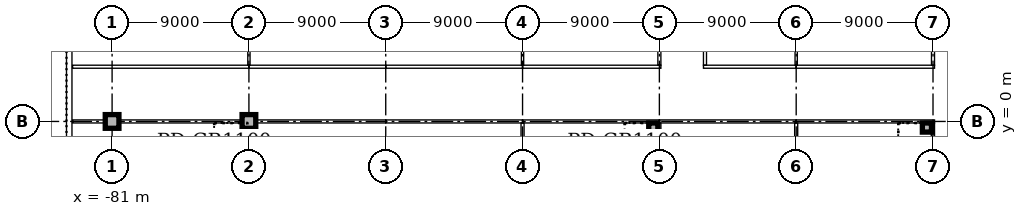
"""IFC4 building model, lengths in metres.
Left out: names, types, materials, properties, quantities, classifications, styles, units other than length and angle.
Written with IfcOpenShell. Run it as: python <this file> out.ifc"""

import sys

from ifc_helpers import new_model, si_unit, direction, frame, frame_2d, origin, origin_2d, place, context, subcontext, project, spatial, rectangle, extrude, element, fill, save


model = new_model("IFC4")
c1 = context("Model", 3, precision=1e-05, world=origin(), true_north=direction((0.0, 1.0)))
c2 = subcontext(c1, "Body", "Model", "MODEL_VIEW")
j1 = project(units=[si_unit("LENGTHUNIT", "METRE"), si_unit("PLANEANGLEUNIT", "RADIAN")], contexts=[c1])
p1 = place(None, origin())
s1 = spatial("IfcSite", under=j1, at=p1, CompositionType="ELEMENT")
p2 = place(p1, origin())
s2 = spatial("IfcBuilding", under=s1, at=p2, CompositionType="ELEMENT")
p3 = place(p2, origin())
s3 = spatial("IfcBuildingStorey", under=s2, at=p3, CompositionType="ELEMENT", Elevation=0.0)
for number, where, z_axis, x_axis in (
    (1, (-81.0, 0.0, 0.0), (0.0, 0.0, 1.0), (1.0, 0.0, 0.0)),
    (2, (-72.0, 0.0, 0.0), (0.0, 0.0, 1.0), (1.0, 0.0, 0.0)),
):
    element("IfcColumn", number, at=place(p3, frame(where, z_axis=z_axis, x_axis=x_axis)), inside=s3, PredefinedType="COLUMN", context=c2, shape_type="SweptSolid", body=[
        extrude(rectangle(XDim=0.9, YDim=0.9, at=origin_2d()), origin(), (0.0, 0.0, 1.0), 5.7),
    ])
p4 = place(p3, frame((-83.82, 54.0, 0.0), z_axis=(0.0, 0.0, 1.0), x_axis=(0.0, -1.0, 0.0)))
e3 = element("IfcWall", 3, at=p4, inside=s3, PredefinedType="STANDARD", context=c2, shape_type="SweptSolid", body=[
    extrude(rectangle(XDim=63.0, YDim=0.36, at=frame_2d((31.5, 0.0))), origin(), (0.0, 0.0, 1.0), 5.7),
])
p5 = place(p4, frame((41.4, 0.0, 0.0)))
e4 = element("IfcOpeningElement", 4, at=p5, cuts=e3, PredefinedType="OPENING", context=c2, shape_type="SweptSolid", body=[
    extrude(rectangle(XDim=1.2, YDim=2.2, at=frame_2d((0.6, 1.1))), frame((0.0, 0.19, 0.0), z_axis=(0.0, -1.0, 0.0), x_axis=(1.0, 0.0, 0.0)), (0.0, 0.0, 1.0), 0.38),
])
p6 = place(p4, frame((30.3, 0.0, 0.0)))
e5 = element("IfcOpeningElement", 5, at=p6, cuts=e3, PredefinedType="OPENING", context=c2, shape_type="SweptSolid", body=[
    extrude(rectangle(XDim=2.4, YDim=2.2, at=frame_2d((1.2, 1.1))), frame((0.0, 0.19, 0.0), z_axis=(0.0, -1.0, 0.0), x_axis=(1.0, 0.0, 0.0)), (0.0, 0.0, 1.0), 0.38),
])
p7 = place(p4, frame((11.85, 0.0, 0.6)))
e6 = element("IfcOpeningElement", 6, at=p7, cuts=e3, PredefinedType="OPENING", context=c2, shape_type="SweptSolid", body=[
    extrude(rectangle(XDim=3.3, YDim=3.0, at=frame_2d((1.65, 1.5))), frame((0.0, 0.19, 0.0), z_axis=(0.0, -1.0, 0.0), x_axis=(1.0, 0.0, 0.0)), (0.0, 0.0, 1.0), 0.38),
])
p8 = place(p4, frame((16.35, 0.0, 0.6)))
e7 = element("IfcOpeningElement", 7, at=p8, cuts=e3, PredefinedType="OPENING", context=c2, shape_type="SweptSolid", body=[
    extrude(rectangle(XDim=3.3, YDim=3.0, at=frame_2d((1.65, 1.5))), frame((0.0, 0.19, 0.0), z_axis=(0.0, -1.0, 0.0), x_axis=(1.0, 0.0, 0.0)), (0.0, 0.0, 1.0), 0.38),
])
p9 = place(p4, frame((20.85, 0.0, 0.6)))
e8 = element("IfcOpeningElement", 8, at=p9, cuts=e3, PredefinedType="OPENING", context=c2, shape_type="SweptSolid", body=[
    extrude(rectangle(XDim=3.3, YDim=3.0, at=frame_2d((1.65, 1.5))), frame((0.0, 0.19, 0.0), z_axis=(0.0, -1.0, 0.0), x_axis=(1.0, 0.0, 0.0)), (0.0, 0.0, 1.0), 0.38),
])
p10 = place(p4, frame((25.35, 0.0, 0.6)))
e9 = element("IfcOpeningElement", 9, at=p10, cuts=e3, PredefinedType="OPENING", context=c2, shape_type="SweptSolid", body=[
    extrude(rectangle(XDim=3.3, YDim=3.0, at=frame_2d((1.65, 1.5))), frame((0.0, 0.19, 0.0), z_axis=(0.0, -1.0, 0.0), x_axis=(1.0, 0.0, 0.0)), (0.0, 0.0, 1.0), 0.38),
])
p11 = place(p4, frame((34.35, 0.0, 0.6)))
e10 = element("IfcOpeningElement", 10, at=p11, cuts=e3, PredefinedType="OPENING", context=c2, shape_type="SweptSolid", body=[
    extrude(rectangle(XDim=3.3, YDim=3.0, at=frame_2d((1.65, 1.5))), frame((0.0, 0.19, 0.0), z_axis=(0.0, -1.0, 0.0), x_axis=(1.0, 0.0, 0.0)), (0.0, 0.0, 1.0), 0.38),
])
p12 = place(p4, frame((43.35, 0.0, 0.6)))
e11 = element("IfcOpeningElement", 11, at=p12, cuts=e3, PredefinedType="OPENING", context=c2, shape_type="SweptSolid", body=[
    extrude(rectangle(XDim=3.3, YDim=3.0, at=frame_2d((1.65, 1.5))), frame((0.0, 0.19, 0.0), z_axis=(0.0, -1.0, 0.0), x_axis=(1.0, 0.0, 0.0)), (0.0, 0.0, 1.0), 0.38),
])
p13 = place(p4, frame((47.85, 0.0, 0.6)))
e12 = element("IfcOpeningElement", 12, at=p13, cuts=e3, PredefinedType="OPENING", context=c2, shape_type="SweptSolid", body=[
    extrude(rectangle(XDim=3.3, YDim=3.0, at=frame_2d((1.65, 1.5))), frame((0.0, 0.19, 0.0), z_axis=(0.0, -1.0, 0.0), x_axis=(1.0, 0.0, 0.0)), (0.0, 0.0, 1.0), 0.38),
])
p14 = place(p4, frame((52.35, 0.0, 0.6)))
e13 = element("IfcOpeningElement", 13, at=p14, cuts=e3, PredefinedType="OPENING", context=c2, shape_type="SweptSolid", body=[
    extrude(rectangle(XDim=3.3, YDim=3.0, at=frame_2d((1.65, 1.5))), frame((0.0, 0.19, 0.0), z_axis=(0.0, -1.0, 0.0), x_axis=(1.0, 0.0, 0.0)), (0.0, 0.0, 1.0), 0.38),
])
p15 = place(p4, frame((56.85, 0.0, 0.6)))
e14 = element("IfcOpeningElement", 14, at=p15, cuts=e3, PredefinedType="OPENING", context=c2, shape_type="SweptSolid", body=[
    extrude(rectangle(XDim=3.3, YDim=3.0, at=frame_2d((1.65, 1.5))), frame((0.0, 0.19, 0.0), z_axis=(0.0, -1.0, 0.0), x_axis=(1.0, 0.0, 0.0)), (0.0, 0.0, 1.0), 0.38),
])
for number, where, z_axis, x_axis in (
    (15, (-45.4, -0.4, 0.0), (0.0, 0.0, 1.0), (1.0, 0.0, 0.0)),
    (16, (-27.4, -0.4, 0.0), (0.0, 0.0, 1.0), (1.0, 0.0, 0.0)),
):
    element("IfcColumn", number, at=place(p3, frame(where, z_axis=z_axis, x_axis=x_axis)), inside=s3, PredefinedType="COLUMN", context=c2, shape_type="SweptSolid", body=[
        extrude(rectangle(XDim=0.6, YDim=0.6, at=origin_2d()), origin(), (0.0, 0.0, 1.0), 6.0),
    ])
p16 = place(p3, frame((-83.6, 0.0, 0.0), z_axis=(0.0, 0.0, 1.0), x_axis=(1.0, 0.0, 0.0)))
e17 = element("IfcWall", 17, at=p16, inside=s3, PredefinedType="SOLIDWALL", context=c2, shape_type="SweptSolid", body=[
    extrude(rectangle(XDim=2.13, YDim=0.2, at=frame_2d((1.065, 0.0))), origin(), (0.0, 0.0, 1.0), 5.7),
])
for number, where, z_axis, x_axis in (
    (18, (-80.53, 0.0, 0.0), (0.0, 0.0, 1.0), (1.0, 0.0, 0.0)),
    (19, (-72.0, -8.53, 0.0), (0.0, 0.0, 1.0), (0.0, 1.0, 0.0)),
):
    element("IfcWall", number, at=place(p3, frame(where, z_axis=z_axis, x_axis=x_axis)), inside=s3, PredefinedType="SOLIDWALL", context=c2, shape_type="SweptSolid", body=[
        extrude(rectangle(XDim=8.06, YDim=0.2, at=frame_2d((4.03, 0.0))), origin(), (0.0, 0.0, 1.0), 5.7),
    ])
p17 = place(p3, frame((-54.0, 0.0, 0.0), z_axis=(0.0, 0.0, 1.0), x_axis=(1.0, 0.0, 0.0)))
e20 = element("IfcWall", 20, at=p17, inside=s3, PredefinedType="SOLIDWALL", context=c2, shape_type="SweptSolid", body=[
    extrude(rectangle(XDim=9.0, YDim=0.2, at=frame_2d((4.5, 0.0))), origin(), (0.0, 0.0, 1.0), 5.7),
])
for number, where, z_axis, x_axis in (
    (21, (-54.0, -8.53, 0.0), (0.0, 0.0, 1.0), (0.0, 1.0, 0.0)),
    (22, (-45.0, -8.53, 0.0), (0.0, 0.0, 1.0), (0.0, 1.0, 0.0)),
    (23, (-27.0, -8.53, 0.0), (0.0, 0.0, 1.0), (0.0, 1.0, 0.0)),
):
    element("IfcWall", number, at=place(p3, frame(where, z_axis=z_axis, x_axis=x_axis)), inside=s3, PredefinedType="SOLIDWALL", context=c2, shape_type="SweptSolid", body=[
        extrude(rectangle(XDim=8.43, YDim=0.2, at=frame_2d((4.215, 0.0))), origin(), (0.0, 0.0, 1.0), 5.7),
    ])
p18 = place(p3, frame((-36.0, 0.0, 0.0), z_axis=(0.0, 0.0, 1.0), x_axis=(1.0, 0.0, 0.0)))
e24 = element("IfcWall", 24, at=p18, inside=s3, PredefinedType="SOLIDWALL", context=c2, shape_type="SweptSolid", body=[
    extrude(rectangle(XDim=9.1, YDim=0.2, at=frame_2d((4.55, 0.0))), origin(), (0.0, 0.0, 1.0), 5.7),
])
p19 = place(p3, frame((-36.0, -8.53, 0.0), z_axis=(0.0, 0.0, 1.0), x_axis=(0.0, 1.0, 0.0)))
e25 = element("IfcWall", 25, at=p19, inside=s3, PredefinedType="SOLIDWALL", context=c2, shape_type="SweptSolid", body=[
    extrude(rectangle(XDim=8.43, YDim=0.2, at=frame_2d((4.215, 0.0))), origin(), (0.0, 0.0, 1.0), 5.7),
])
p20 = place(p3, frame((-27.0, 3.7, 0.0), z_axis=(0.0, 0.0, 1.0), x_axis=(0.0, 1.0, 0.0)))
e26 = element("IfcWall", 26, at=p20, inside=s3, PredefinedType="PARTITIONING", context=c2, shape_type="SweptSolid", body=[
    extrude(rectangle(XDim=8.3, YDim=0.2, at=frame_2d((4.15, 0.0))), origin(), (0.0, 0.0, 1.0), 5.7),
])
p21 = place(p3, frame((-63.0, 0.0, 0.0), z_axis=(0.0, 0.0, 1.0), x_axis=(1.0, 0.0, 0.0)))
e27 = element("IfcWall", 27, at=p21, inside=s3, PredefinedType="PARTITIONING", context=c2, shape_type="SweptSolid", body=[
    extrude(rectangle(XDim=9.0, YDim=0.2, at=frame_2d((4.5, 0.0))), origin(), (0.0, 0.0, 1.0), 5.7),
])
p22 = place(p21, frame((7.7, 0.0, 0.0)))
e28 = element("IfcOpeningElement", 28, at=p22, cuts=e27, PredefinedType="OPENING", context=c2, shape_type="SweptSolid", body=[
    extrude(rectangle(XDim=1.0, YDim=2.1, at=frame_2d((0.5, 1.05))), frame((0.0, 0.11, 0.0), z_axis=(0.0, -1.0, 0.0), x_axis=(1.0, 0.0, 0.0)), (0.0, 0.0, 1.0), 0.22),
])
p23 = place(p3, frame((-71.53, 0.0, 0.0), z_axis=(0.0, 0.0, 1.0), x_axis=(1.0, 0.0, 0.0)))
e29 = element("IfcWall", 29, at=p23, inside=s3, PredefinedType="PARTITIONING", context=c2, shape_type="SweptSolid", body=[
    extrude(rectangle(XDim=8.53, YDim=0.2, at=frame_2d((4.265, 0.0))), origin(), (0.0, 0.0, 1.0), 5.7),
])
p24 = place(p3, frame((-45.0, 0.0, 0.0), z_axis=(0.0, 0.0, 1.0), x_axis=(1.0, 0.0, 0.0)))
e30 = element("IfcWall", 30, at=p24, inside=s3, PredefinedType="PARTITIONING", context=c2, shape_type="SweptSolid", body=[
    extrude(rectangle(XDim=9.0, YDim=0.2, at=frame_2d((4.5, 0.0))), origin(), (0.0, 0.0, 1.0), 5.7),
])
p25 = place(p24, frame((4.0, 0.0, 0.0)))
e31 = element("IfcOpeningElement", 31, at=p25, cuts=e30, PredefinedType="OPENING", context=c2, shape_type="SweptSolid", body=[
    extrude(rectangle(XDim=1.0, YDim=2.1, at=frame_2d((0.5, 1.05))), frame((0.0, 0.11, 0.0), z_axis=(0.0, -1.0, 0.0), x_axis=(1.0, 0.0, 0.0)), (0.0, 0.0, 1.0), 0.22),
])
p26 = place(p3, frame((-83.6, 3.6, 0.0), z_axis=(0.0, 0.0, 1.0), x_axis=(1.0, 0.0, 0.0)))
e32 = element("IfcWall", 32, at=p26, inside=s3, PredefinedType="PARTITIONING", context=c2, shape_type="SweptSolid", body=[
    extrude(rectangle(XDim=11.6, YDim=0.2, at=frame_2d((5.8, 0.0))), origin(), (0.0, 0.0, 1.0), 5.7),
])
p27 = place(p26, frame((5.1, 0.0, 0.0)))
e33 = element("IfcOpeningElement", 33, at=p27, cuts=e32, PredefinedType="OPENING", context=c2, shape_type="SweptSolid", body=[
    extrude(rectangle(XDim=1.0, YDim=2.1, at=frame_2d((0.5, 1.05))), frame((0.0, 0.11, 0.0), z_axis=(0.0, -1.0, 0.0), x_axis=(1.0, 0.0, 0.0)), (0.0, 0.0, 1.0), 0.22),
])
p28 = place(p3, frame((-72.0, 3.6, 0.0), z_axis=(0.0, 0.0, 1.0), x_axis=(1.0, 0.0, 0.0)))
e34 = element("IfcWall", 34, at=p28, inside=s3, PredefinedType="PARTITIONING", context=c2, shape_type="SweptSolid", body=[
    extrude(rectangle(XDim=9.0, YDim=0.2, at=frame_2d((4.5, 0.0))), origin(), (0.0, 0.0, 1.0), 5.7),
])
p29 = place(p28, frame((6.9, 0.0, 0.0)))
e35 = element("IfcOpeningElement", 35, at=p29, cuts=e34, PredefinedType="OPENING", context=c2, shape_type="SweptSolid", body=[
    extrude(rectangle(XDim=1.8, YDim=2.1, at=frame_2d((0.9, 1.05))), frame((0.0, 0.11, 0.0), z_axis=(0.0, -1.0, 0.0), x_axis=(1.0, 0.0, 0.0)), (0.0, 0.0, 1.0), 0.22),
])
p30 = place(p3, frame((-63.0, 3.6, 0.0), z_axis=(0.0, 0.0, 1.0), x_axis=(1.0, 0.0, 0.0)))
e36 = element("IfcWall", 36, at=p30, inside=s3, PredefinedType="PARTITIONING", context=c2, shape_type="SweptSolid", body=[
    extrude(rectangle(XDim=9.0, YDim=0.2, at=frame_2d((4.5, 0.0))), origin(), (0.0, 0.0, 1.0), 5.7),
])
p31 = place(p3, frame((-54.0, 3.6, 0.0), z_axis=(0.0, 0.0, 1.0), x_axis=(1.0, 0.0, 0.0)))
e37 = element("IfcWall", 37, at=p31, inside=s3, PredefinedType="PARTITIONING", context=c2, shape_type="SweptSolid", body=[
    extrude(rectangle(XDim=9.1, YDim=0.2, at=frame_2d((4.55, 0.0))), origin(), (0.0, 0.0, 1.0), 5.7),
])
p32 = place(p3, frame((-42.1, 3.6, 0.0), z_axis=(0.0, 0.0, 1.0), x_axis=(1.0, 0.0, 0.0)))
e38 = element("IfcWall", 38, at=p32, inside=s3, PredefinedType="PARTITIONING", context=c2, shape_type="SweptSolid", body=[
    extrude(rectangle(XDim=6.1, YDim=0.2, at=frame_2d((3.05, 0.0))), origin(), (0.0, 0.0, 1.0), 5.7),
])
p33 = place(p3, frame((-36.0, 3.6, 0.0), z_axis=(0.0, 0.0, 1.0), x_axis=(1.0, 0.0, 0.0)))
e39 = element("IfcWall", 39, at=p33, inside=s3, PredefinedType="PARTITIONING", context=c2, shape_type="SweptSolid", body=[
    extrude(rectangle(XDim=9.1, YDim=0.2, at=frame_2d((4.55, 0.0))), origin(), (0.0, 0.0, 1.0), 5.7),
])
p34 = place(p33, frame((4.0, 0.0, 0.0)))
e40 = element("IfcOpeningElement", 40, at=p34, cuts=e39, PredefinedType="OPENING", context=c2, shape_type="SweptSolid", body=[
    extrude(rectangle(XDim=1.0, YDim=2.1, at=frame_2d((0.5, 1.05))), frame((0.0, 0.11, 0.0), z_axis=(0.0, -1.0, 0.0), x_axis=(1.0, 0.0, 0.0)), (0.0, 0.0, 1.0), 0.22),
])
p35 = place(p3, frame((-45.0, 3.7, 0.0), z_axis=(0.0, 0.0, 1.0), x_axis=(0.0, 1.0, 0.0)))
e41 = element("IfcWall", 41, at=p35, inside=s3, PredefinedType="PARTITIONING", context=c2, shape_type="SweptSolid", body=[
    extrude(rectangle(XDim=1.23, YDim=0.2, at=frame_2d((0.615, 0.0))), origin(), (0.0, 0.0, 1.0), 5.7),
])
p36 = place(p3, frame((-42.0, 3.7, 0.0), z_axis=(0.0, 0.0, 1.0), x_axis=(0.0, 1.0, 0.0)))
e42 = element("IfcWall", 42, at=p36, inside=s3, PredefinedType="PARTITIONING", context=c2, shape_type="SweptSolid", body=[
    extrude(rectangle(XDim=16.7, YDim=0.2, at=frame_2d((8.35, 0.0))), origin(), (0.0, 0.0, 1.0), 5.7),
])
p37 = place(p36, frame((7.8, 0.0, 0.0)))
e43 = element("IfcOpeningElement", 43, at=p37, cuts=e42, PredefinedType="OPENING", context=c2, shape_type="SweptSolid", body=[
    extrude(rectangle(XDim=1.0, YDim=2.1, at=frame_2d((0.5, 1.05))), frame((0.0, 0.11, 0.0), z_axis=(0.0, -1.0, 0.0), x_axis=(1.0, 0.0, 0.0)), (0.0, 0.0, 1.0), 0.22),
])
p38 = place(p3, frame((-72.0, 3.7, 0.0), z_axis=(0.0, 0.0, 1.0), x_axis=(0.0, 1.0, 0.0)))
e44 = element("IfcWall", 44, at=p38, inside=s3, PredefinedType="PARTITIONING", context=c2, shape_type="SweptSolid", body=[
    extrude(rectangle(XDim=17.2, YDim=0.15, at=frame_2d((8.6, 0.0))), origin(), (0.0, 0.0, 1.0), 5.7),
])
for number, where, z_axis, x_axis in (
    (45, (-54.0, 3.7, 0.0), (0.0, 0.0, 1.0), (0.0, 1.0, 0.0)),
    (46, (-36.0, 3.7, 0.0), (0.0, 0.0, 1.0), (0.0, 1.0, 0.0)),
):
    element("IfcWall", number, at=place(p3, frame(where, z_axis=z_axis, x_axis=x_axis)), inside=s3, PredefinedType="PARTITIONING", context=c2, shape_type="SweptSolid", body=[
        extrude(rectangle(XDim=1.23, YDim=0.15, at=frame_2d((0.615, 0.0))), origin(), (0.0, 0.0, 1.0), 5.7),
    ])
p39 = place(p13, origin())
e47 = element("IfcWindow", 47, at=p39, inside=s3, PartitioningType="SINGLE_PANEL", PredefinedType="WINDOW", context=c2, shape_type="SweptSolid", body=[
    extrude(rectangle(XDim=3.3, YDim=3.0, at=frame_2d((1.65, 1.5))), frame((0.0, 0.13, 0.0), z_axis=(0.0, -1.0, 0.0), x_axis=(1.0, 0.0, 0.0)), (0.0, 0.0, 1.0), 0.06),
])
fill(e12, e47)
p40 = place(p14, origin())
e48 = element("IfcWindow", 48, at=p40, inside=s3, PartitioningType="SINGLE_PANEL", PredefinedType="WINDOW", context=c2, shape_type="SweptSolid", body=[
    extrude(rectangle(XDim=3.3, YDim=3.0, at=frame_2d((1.65, 1.5))), frame((0.0, 0.13, 0.0), z_axis=(0.0, -1.0, 0.0), x_axis=(1.0, 0.0, 0.0)), (0.0, 0.0, 1.0), 0.06),
])
fill(e13, e48)
p41 = place(p22, frame((1.0, 0.0, 0.0), z_axis=(0.0, 0.0, 1.0), x_axis=(-1.0, 0.0, 0.0)))
e49 = element("IfcDoor", 49, at=p41, inside=s3, OperationType="SINGLE_SWING_LEFT", PredefinedType="DOOR", context=c2, shape_type="SweptSolid", body=[
    extrude(rectangle(XDim=1.0, YDim=2.1, at=frame_2d((0.5, 1.05))), frame((0.0, 0.025, 0.0), z_axis=(0.0, -1.0, 0.0), x_axis=(1.0, 0.0, 0.0)), (0.0, 0.0, 1.0), 0.05),
])
fill(e28, e49)
p42 = place(p25, frame((1.0, 0.0, 0.0), z_axis=(0.0, 0.0, 1.0), x_axis=(-1.0, 0.0, 0.0)))
e50 = element("IfcDoor", 50, at=p42, inside=s3, OperationType="SINGLE_SWING_LEFT", PredefinedType="DOOR", context=c2, shape_type="SweptSolid", body=[
    extrude(rectangle(XDim=1.0, YDim=2.1, at=frame_2d((0.5, 1.05))), frame((0.0, 0.025, 0.0), z_axis=(0.0, -1.0, 0.0), x_axis=(1.0, 0.0, 0.0)), (0.0, 0.0, 1.0), 0.05),
])
fill(e31, e50)
p43 = place(p27, origin())
e51 = element("IfcDoor", 51, at=p43, inside=s3, OperationType="SINGLE_SWING_RIGHT", PredefinedType="DOOR", context=c2, shape_type="SweptSolid", body=[
    extrude(rectangle(XDim=1.0, YDim=2.1, at=frame_2d((0.5, 1.05))), frame((0.0, 0.025, 0.0), z_axis=(0.0, -1.0, 0.0), x_axis=(1.0, 0.0, 0.0)), (0.0, 0.0, 1.0), 0.05),
])
fill(e33, e51)
p44 = place(p29, origin())
e52 = element("IfcDoor", 52, at=p44, inside=s3, OperationType="DOUBLE_DOOR_SINGLE_SWING", PredefinedType="DOOR", context=c2, shape_type="SweptSolid", body=[
    extrude(rectangle(XDim=1.8, YDim=2.1, at=frame_2d((0.9, 1.05))), frame((0.0, 0.025, 0.0), z_axis=(0.0, -1.0, 0.0), x_axis=(1.0, 0.0, 0.0)), (0.0, 0.0, 1.0), 0.05),
])
fill(e35, e52)
p45 = place(p34, origin())
e53 = element("IfcDoor", 53, at=p45, inside=s3, OperationType="SINGLE_SWING_RIGHT", PredefinedType="DOOR", context=c2, shape_type="SweptSolid", body=[
    extrude(rectangle(XDim=1.0, YDim=2.1, at=frame_2d((0.5, 1.05))), frame((0.0, 0.025, 0.0), z_axis=(0.0, -1.0, 0.0), x_axis=(1.0, 0.0, 0.0)), (0.0, 0.0, 1.0), 0.05),
])
fill(e40, e53)
save(model, sys.argv[1])
